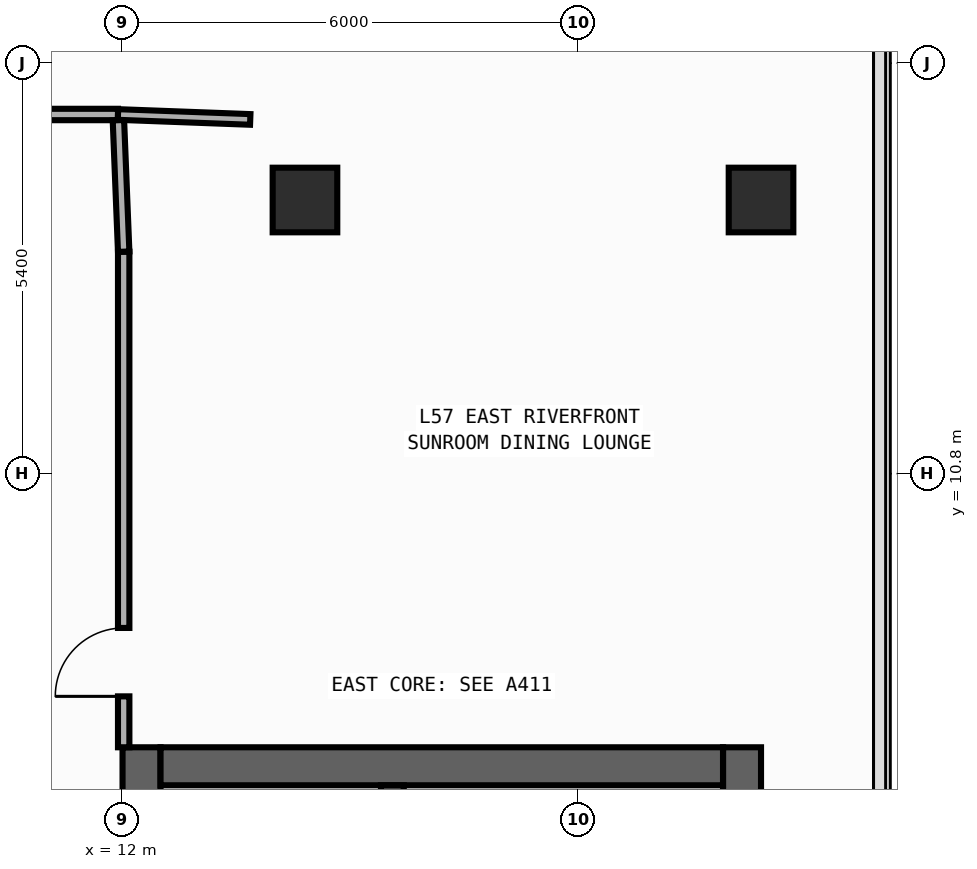
"""IFC4 building model, lengths in metres.
Left out: names, types, materials, properties, quantities, classifications, styles, units other than length and angle.
Written with IfcOpenShell. Run it as: python <this file> out.ifc"""

import sys

from ifc_helpers import new_model, si_unit, direction, frame, frame_2d, origin, origin_2d, place, context, subcontext, project, spatial, rectangle, extrude, element, fill, save


model = new_model("IFC4")
c1 = context("Model", 3, precision=1e-05, world=origin(), true_north=direction((0.0, 1.0)))
c2 = subcontext(c1, "Body", "Model", "MODEL_VIEW")
j1 = project(units=[si_unit("LENGTHUNIT", "METRE"), si_unit("PLANEANGLEUNIT", "RADIAN")], contexts=[c1])
p1 = place(None, origin())
s1 = spatial("IfcSite", under=j1, at=p1, CompositionType="ELEMENT")
p2 = place(p1, origin())
s2 = spatial("IfcBuilding", under=s1, at=p2, CompositionType="ELEMENT")
p3 = place(p2, frame((0.0, 0.0, 244.0)))
s3 = spatial("IfcBuildingStorey", under=s2, at=p3, CompositionType="ELEMENT", Elevation=244.0)
p4 = place(p3, frame((12.25, -19.8, 0.0), z_axis=(0.0, 0.0, 1.0), x_axis=(0.0, 1.0, 0.0)))
e1 = element("IfcWall", 1, at=p4, inside=s3, PredefinedType="SHEAR", context=c2, shape_type="SweptSolid", body=[
    extrude(rectangle(XDim=27.0, YDim=0.5, at=frame_2d((13.5, 0.0))), origin(), (0.0, 0.0, 1.0), 3.34),
])
p5 = place(p4, frame((23.05, 0.0, 0.0)))
e2 = element("IfcOpeningElement", 2, at=p5, cuts=e1, PredefinedType="OPENING", context=c2, shape_type="SweptSolid", body=[
    extrude(rectangle(XDim=1.1, YDim=2.2, at=frame_2d((0.55, 1.1))), frame((0.0, 0.26, 0.0), z_axis=(0.0, -1.0, 0.0), x_axis=(1.0, 0.0, 0.0)), (0.0, 0.0, 1.0), 0.52),
])
p6 = place(p4, frame((19.85, 0.0, 0.0)))
e3 = element("IfcOpeningElement", 3, at=p6, cuts=e1, PredefinedType="OPENING", context=c2, shape_type="SweptSolid", body=[
    extrude(rectangle(XDim=1.1, YDim=2.2, at=frame_2d((0.55, 1.1))), frame((0.0, 0.26, 0.0), z_axis=(0.0, -1.0, 0.0), x_axis=(1.0, 0.0, 0.0)), (0.0, 0.0, 1.0), 0.52),
])
p7 = place(p4, frame((16.65, 0.0, 0.0)))
e4 = element("IfcOpeningElement", 4, at=p7, cuts=e1, PredefinedType="OPENING", context=c2, shape_type="SweptSolid", body=[
    extrude(rectangle(XDim=1.1, YDim=2.2, at=frame_2d((0.55, 1.1))), frame((0.0, 0.26, 0.0), z_axis=(0.0, -1.0, 0.0), x_axis=(1.0, 0.0, 0.0)), (0.0, 0.0, 1.0), 0.52),
])
p8 = place(p4, frame((10.175, 0.0, 0.0)))
e5 = element("IfcOpeningElement", 5, at=p8, cuts=e1, PredefinedType="OPENING", context=c2, shape_type="SweptSolid", body=[
    extrude(rectangle(XDim=0.85, YDim=2.1, at=frame_2d((0.425, 1.05))), frame((0.0, 0.26, 0.0), z_axis=(0.0, -1.0, 0.0), x_axis=(1.0, 0.0, 0.0)), (0.0, 0.0, 1.0), 0.52),
])
p9 = place(p4, frame((12.725, 0.0, 0.0)))
e6 = element("IfcOpeningElement", 6, at=p9, cuts=e1, PredefinedType="OPENING", context=c2, shape_type="SweptSolid", body=[
    extrude(rectangle(XDim=1.15, YDim=2.2, at=frame_2d((0.575, 1.1))), frame((0.0, 0.26, 0.0), z_axis=(0.0, -1.0, 0.0), x_axis=(1.0, 0.0, 0.0)), (0.0, 0.0, 1.0), 0.52),
])
p10 = place(p4, frame((25.125, 0.0, 0.0)))
e7 = element("IfcOpeningElement", 7, at=p10, cuts=e1, PredefinedType="OPENING", context=c2, shape_type="SweptSolid", body=[
    extrude(rectangle(XDim=0.85, YDim=2.1, at=frame_2d((0.425, 1.05))), frame((0.0, 0.26, 0.0), z_axis=(0.0, -1.0, 0.0), x_axis=(1.0, 0.0, 0.0)), (0.0, 0.0, 1.0), 0.52),
])
p11 = place(p3, frame((20.15, -19.8, 0.0), z_axis=(0.0, 0.0, 1.0), x_axis=(0.0, 1.0, 0.0)))
e8 = element("IfcWall", 8, at=p11, inside=s3, PredefinedType="SHEAR", context=c2, shape_type="SweptSolid", body=[
    extrude(rectangle(XDim=27.0, YDim=0.5, at=frame_2d((13.5, 0.0))), origin(), (0.0, 0.0, 1.0), 3.34),
])
p12 = place(p3, frame((12.5, 6.95, 0.0), z_axis=(0.0, 0.0, 1.0), x_axis=(1.0, 0.0, 0.0)))
e9 = element("IfcWall", 9, at=p12, inside=s3, PredefinedType="SHEAR", context=c2, shape_type="SweptSolid", body=[
    extrude(rectangle(XDim=7.4, YDim=0.5, at=frame_2d((3.7, 0.0))), origin(), (0.0, 0.0, 1.0), 3.34),
])
p13 = place(p3, frame((15.55, -19.3, 0.0), z_axis=(0.0, 0.0, 1.0), x_axis=(0.0, 1.0, 0.0)))
e10 = element("IfcWall", 10, at=p13, inside=s3, PredefinedType="SHEAR", context=c2, shape_type="SweptSolid", body=[
    extrude(rectangle(XDim=26.0, YDim=0.3, at=frame_2d((13.0, 0.0))), origin(), (0.0, 0.0, 1.0), 3.34),
])
p14 = place(p13, frame((12.225, 0.0, 0.0)))
e11 = element("IfcOpeningElement", 11, at=p14, cuts=e10, PredefinedType="OPENING", context=c2, shape_type="SweptSolid", body=[
    extrude(rectangle(XDim=1.15, YDim=2.2, at=frame_2d((0.575, 1.1))), frame((0.0, 0.16, 0.0), z_axis=(0.0, -1.0, 0.0), x_axis=(1.0, 0.0, 0.0)), (0.0, 0.0, 1.0), 0.32),
])
p15 = place(p13, frame((24.625, 0.0, 0.0)))
e12 = element("IfcOpeningElement", 12, at=p15, cuts=e10, PredefinedType="OPENING", context=c2, shape_type="SweptSolid", body=[
    extrude(rectangle(XDim=0.85, YDim=2.1, at=frame_2d((0.425, 1.05))), frame((0.0, 0.16, 0.0), z_axis=(0.0, -1.0, 0.0), x_axis=(1.0, 0.0, 0.0)), (0.0, 0.0, 1.0), 0.32),
])
for number, where, z_axis, x_axis in (
    (13, (20.4, 14.4, 0.0), (0.0, 0.0, 1.0), (1.0, 0.0, 0.0)),
    (14, (14.4, 14.4, 0.0), (0.0, 0.0, 1.0), (1.0, 0.0, 0.0)),
):
    element("IfcColumn", number, at=place(p3, frame(where, z_axis=z_axis, x_axis=x_axis)), inside=s3, PredefinedType="COLUMN", context=c2, shape_type="SweptSolid", body=[
        extrude(rectangle(XDim=0.85, YDim=0.85, at=origin_2d()), origin(), (0.0, 0.0, 1.0), 3.6),
    ])
p16 = place(p3, frame((12.015, 7.2, 0.0), z_axis=(0.0, 0.0, 1.0), x_axis=(0.0, 1.0, 0.0)))
e15 = element("IfcWall", 15, at=p16, inside=s3, PredefinedType="PARTITIONING", context=c2, shape_type="SweptSolid", body=[
    extrude(rectangle(XDim=6.52, YDim=0.15, at=frame_2d((3.26, 0.0))), origin(), (0.0, 0.0, 1.0), 3.34),
])
p17 = place(p16, frame((0.67, 0.0, 0.0)))
e16 = element("IfcOpeningElement", 16, at=p17, cuts=e15, PredefinedType="OPENING", context=c2, shape_type="SweptSolid", body=[
    extrude(rectangle(XDim=0.9, YDim=2.15, at=frame_2d((0.45, 1.075))), frame((0.0, 0.085, 0.0), z_axis=(0.0, -1.0, 0.0), x_axis=(1.0, 0.0, 0.0)), (0.0, 0.0, 1.0), 0.17),
])
p18 = place(p3, frame((5.19, 15.525, 0.0), z_axis=(0.0, 0.0, 1.0), x_axis=(1.0, 0.0, 0.0)))
e17 = element("IfcWall", 17, at=p18, inside=s3, PredefinedType="PARTITIONING", context=c2, shape_type="SweptSolid", body=[
    extrude(rectangle(XDim=6.75, YDim=0.15, at=frame_2d((3.375, 0.0))), origin(), (0.0, 0.0, 1.0), 3.34),
])
p19 = place(p18, frame((1.487, 0.0, 0.0)))
e18 = element("IfcOpeningElement", 18, at=p19, cuts=e17, PredefinedType="OPENING", context=c2, shape_type="SweptSolid", body=[
    extrude(rectangle(XDim=0.9, YDim=2.15, at=frame_2d((0.45, 1.075))), frame((0.0, 0.085, 0.0), z_axis=(0.0, -1.0, 0.0), x_axis=(1.0, 0.0, 0.0)), (0.0, 0.0, 1.0), 0.17),
])
p20 = place(p3, frame((12.015, 13.72, 0.0), z_axis=(0.0, 0.0, 1.0), x_axis=(-0.040046877756, 0.99919780203, 0.0)))
e19 = element("IfcWall", 19, at=p20, inside=s3, PredefinedType="PARTITIONING", context=c2, shape_type="SweptSolid", body=[
    extrude(rectangle(XDim=1.731, YDim=0.15, at=frame_2d((0.866, 0.0))), origin(), (0.0, 0.0, 1.0), 3.34),
])
p21 = place(p3, frame((11.94, 15.525, 0.0), z_axis=(0.0, 0.0, 1.0), x_axis=(0.999304229002, -0.037296888581, 0.0)))
e20 = element("IfcWall", 20, at=p21, inside=s3, PredefinedType="PARTITIONING", context=c2, shape_type="SweptSolid", body=[
    extrude(rectangle(XDim=1.741, YDim=0.14, at=frame_2d((0.871, 0.0))), origin(), (0.0, 0.0, 1.0), 3.34),
])
p22 = place(p17, origin())
e21 = element("IfcDoor", 21, at=p22, inside=s3, OperationType="SINGLE_SWING_LEFT", PredefinedType="DOOR", context=c2, shape_type="SweptSolid", body=[
    extrude(rectangle(XDim=0.9, YDim=2.15, at=frame_2d((0.45, 1.075))), frame((0.0, 0.025, 0.0), z_axis=(0.0, -1.0, 0.0), x_axis=(1.0, 0.0, 0.0)), (0.0, 0.0, 1.0), 0.05),
])
fill(e16, e21)
save(model, sys.argv[1])
